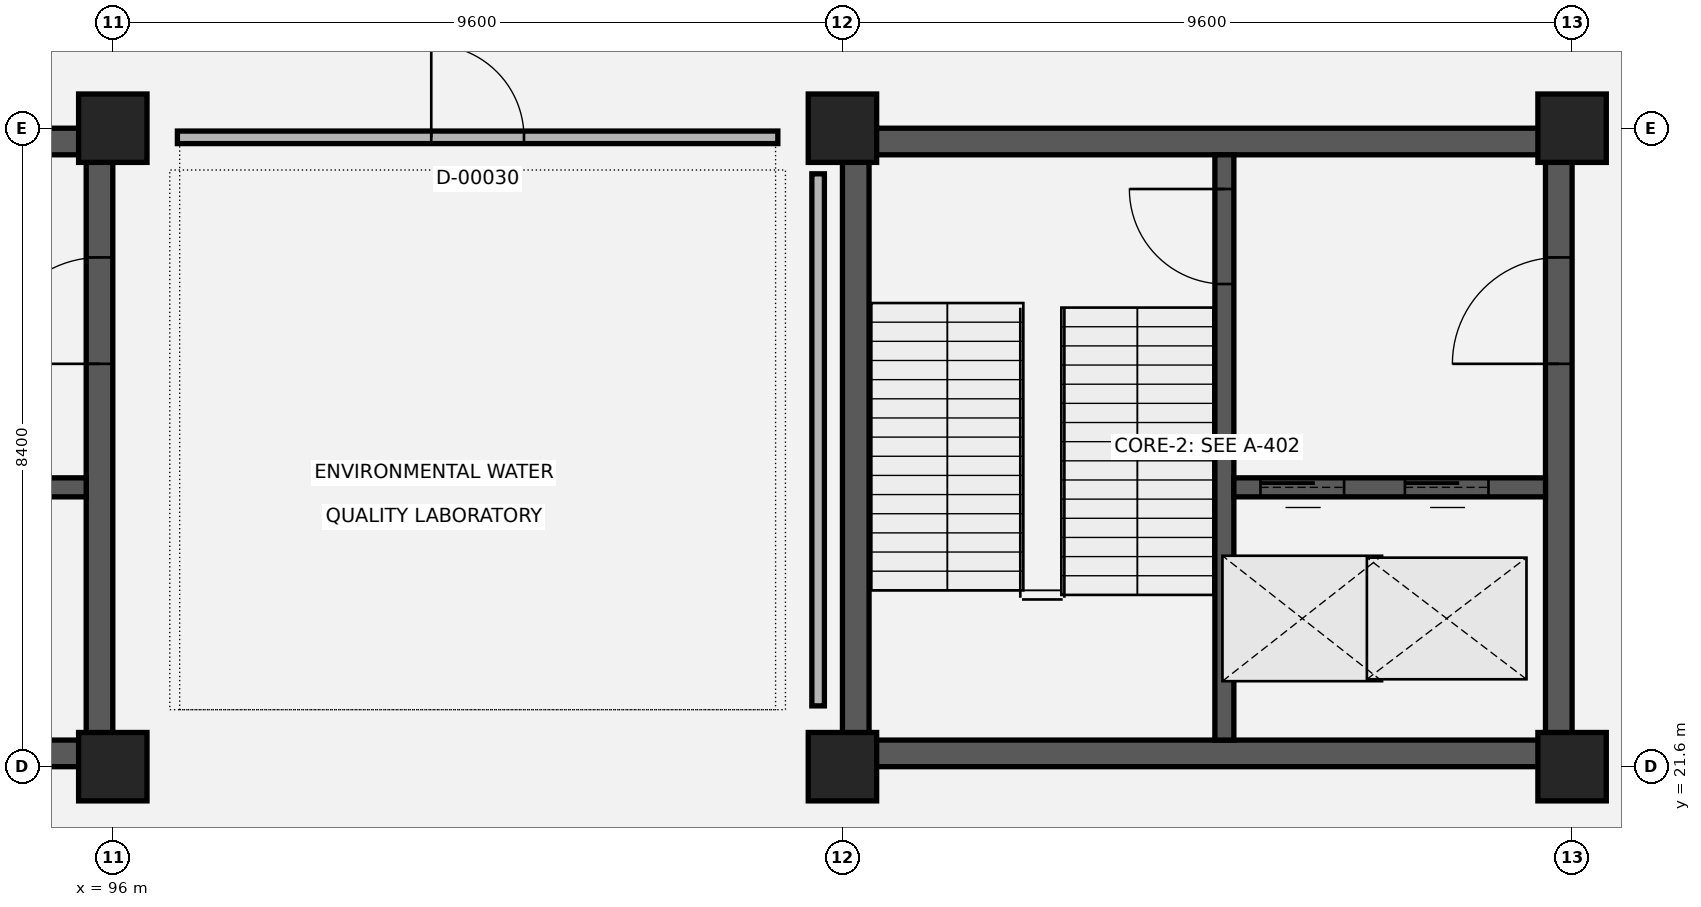
"""IFC4 building model, lengths in metres.
Left out: names, types, materials, properties, quantities, classifications, styles, units other than length and angle.
Written with IfcOpenShell. Run it as: python <this file> out.ifc"""

import sys

from ifc_helpers import new_model, si_unit, direction, frame, frame_2d, origin, origin_2d, place, context, subcontext, project, spatial, rectangle, extrude, element, fill, save


model = new_model("IFC4")
c1 = context("Model", 3, precision=1e-05, world=origin(), true_north=direction((0.0, 1.0)))
c2 = subcontext(c1, "Body", "Model", "MODEL_VIEW")
j1 = project(units=[si_unit("LENGTHUNIT", "METRE"), si_unit("PLANEANGLEUNIT", "RADIAN")], contexts=[c1])
p1 = place(None, origin())
s1 = spatial("IfcSite", under=j1, at=p1, CompositionType="ELEMENT")
p2 = place(p1, origin())
s2 = spatial("IfcBuilding", under=s1, at=p2, CompositionType="ELEMENT")
p3 = place(p2, origin())
s3 = spatial("IfcBuildingStorey", under=s2, at=p3, CompositionType="ELEMENT", Elevation=0.0)
for number, where, z_axis, x_axis in (
    (1, (96.0, 21.6, 0.0), (0.0, 0.0, 1.0), (1.0, 0.0, 0.0)),
    (2, (96.0, 30.0, 0.0), (0.0, 0.0, 1.0), (1.0, 0.0, 0.0)),
    (3, (105.6, 21.6, 0.0), (0.0, 0.0, 1.0), (1.0, 0.0, 0.0)),
    (4, (105.6, 30.0, 0.0), (0.0, 0.0, 1.0), (1.0, 0.0, 0.0)),
    (5, (115.2, 21.6, 0.0), (0.0, 0.0, 1.0), (1.0, 0.0, 0.0)),
    (6, (115.2, 30.0, 0.0), (0.0, 0.0, 1.0), (1.0, 0.0, 0.0)),
):
    element("IfcColumn", number, at=place(p3, frame(where, z_axis=z_axis, x_axis=x_axis)), inside=s3, PredefinedType="COLUMN", context=c2, shape_type="SweptSolid", body=[
        extrude(rectangle(XDim=0.9, YDim=0.9, at=origin_2d()), origin(), (0.0, 0.0, 1.0), 5.4),
    ])
for number, where, z_axis, x_axis in (
    (7, (105.6, 29.825, 0.0), (0.0, 0.0, 1.0), (1.0, 0.0, 0.0)),
    (8, (105.6, 21.775, 0.0), (0.0, 0.0, 1.0), (1.0, 0.0, 0.0)),
):
    element("IfcWall", number, at=place(p3, frame(where, z_axis=z_axis, x_axis=x_axis)), inside=s3, PredefinedType="SHEAR", context=c2, shape_type="SweptSolid", body=[
        extrude(rectangle(XDim=9.6, YDim=0.35, at=frame_2d((4.8, 0.0))), origin(), (0.0, 0.0, 1.0), 5.11),
    ])
p4 = place(p3, frame((105.775, 21.6, 0.0), z_axis=(0.0, 0.0, 1.0), x_axis=(0.0, 1.0, 0.0)))
e9 = element("IfcWall", 9, at=p4, inside=s3, PredefinedType="SHEAR", context=c2, shape_type="SweptSolid", body=[
    extrude(rectangle(XDim=8.4, YDim=0.35, at=frame_2d((4.2, 0.0))), origin(), (0.0, 0.0, 1.0), 5.11),
])
p5 = place(p3, frame((115.025, 21.6, 0.0), z_axis=(0.0, 0.0, 1.0), x_axis=(0.0, 1.0, 0.0)))
e10 = element("IfcWall", 10, at=p5, inside=s3, PredefinedType="SHEAR", context=c2, shape_type="SweptSolid", body=[
    extrude(rectangle(XDim=8.4, YDim=0.35, at=frame_2d((4.2, 0.0))), origin(), (0.0, 0.0, 1.0), 5.11),
])
p6 = place(p5, frame((5.3, 0.0, 0.0)))
e11 = element("IfcOpeningElement", 11, at=p6, cuts=e10, PredefinedType="OPENING", context=c2, shape_type="SweptSolid", body=[
    extrude(rectangle(XDim=1.4, YDim=2.15, at=frame_2d((0.7, 1.075))), frame((0.0, 0.185, 0.0), z_axis=(0.0, -1.0, 0.0), x_axis=(1.0, 0.0, 0.0)), (0.0, 0.0, 1.0), 0.37),
])
p7 = place(p3, frame((110.625, 29.65, 0.0), z_axis=(0.0, 0.0, 1.0), x_axis=(0.0, -1.0, 0.0)))
e12 = element("IfcWall", 12, at=p7, inside=s3, PredefinedType="SHEAR", context=c2, shape_type="SweptSolid", body=[
    extrude(rectangle(XDim=7.7, YDim=0.25, at=frame_2d((3.85, 0.0))), origin(), (0.0, 0.0, 1.0), 5.11),
])
p8 = place(p7, frame((0.45, 0.0, 0.0)))
e13 = element("IfcOpeningElement", 13, at=p8, cuts=e12, PredefinedType="OPENING", context=c2, shape_type="SweptSolid", body=[
    extrude(rectangle(XDim=1.25, YDim=2.15, at=frame_2d((0.625, 1.075))), frame((0.0, 0.135, 0.0), z_axis=(0.0, -1.0, 0.0), x_axis=(1.0, 0.0, 0.0)), (0.0, 0.0, 1.0), 0.27),
])
p9 = place(p3, frame((110.75, 25.275, 0.0), z_axis=(0.0, 0.0, 1.0), x_axis=(1.0, 0.0, 0.0)))
e14 = element("IfcWall", 14, at=p9, inside=s3, PredefinedType="SHEAR", context=c2, shape_type="SweptSolid", body=[
    extrude(rectangle(XDim=4.1, YDim=0.25, at=frame_2d((2.05, 0.0))), origin(), (0.0, 0.0, 1.0), 5.11),
])
p10 = place(p9, frame((0.35, 0.0, 0.0)))
e15 = element("IfcOpeningElement", 15, at=p10, cuts=e14, PredefinedType="OPENING", context=c2, shape_type="SweptSolid", body=[
    extrude(rectangle(XDim=1.1, YDim=2.15, at=frame_2d((0.55, 1.075))), frame((0.0, 0.135, 0.0), z_axis=(0.0, -1.0, 0.0), x_axis=(1.0, 0.0, 0.0)), (0.0, 0.0, 1.0), 0.27),
])
p11 = place(p9, frame((2.25, 0.0, 0.0)))
e16 = element("IfcOpeningElement", 16, at=p11, cuts=e14, PredefinedType="OPENING", context=c2, shape_type="SweptSolid", body=[
    extrude(rectangle(XDim=1.1, YDim=2.15, at=frame_2d((0.55, 1.075))), frame((0.0, 0.135, 0.0), z_axis=(0.0, -1.0, 0.0), x_axis=(1.0, 0.0, 0.0)), (0.0, 0.0, 1.0), 0.27),
])
for number, where, z_axis, x_axis in (
    (17, (86.4, 29.825, 0.0), (0.0, 0.0, 1.0), (1.0, 0.0, 0.0)),
    (18, (86.4, 21.775, 0.0), (0.0, 0.0, 1.0), (1.0, 0.0, 0.0)),
):
    element("IfcWall", number, at=place(p3, frame(where, z_axis=z_axis, x_axis=x_axis)), inside=s3, PredefinedType="SHEAR", context=c2, shape_type="SweptSolid", body=[
        extrude(rectangle(XDim=9.6, YDim=0.35, at=frame_2d((4.8, 0.0))), origin(), (0.0, 0.0, 1.0), 5.11),
    ])
p12 = place(p3, frame((95.825, 21.6, 0.0), z_axis=(0.0, 0.0, 1.0), x_axis=(0.0, 1.0, 0.0)))
e19 = element("IfcWall", 19, at=p12, inside=s3, PredefinedType="SHEAR", context=c2, shape_type="SweptSolid", body=[
    extrude(rectangle(XDim=8.4, YDim=0.35, at=frame_2d((4.2, 0.0))), origin(), (0.0, 0.0, 1.0), 5.11),
])
p13 = place(p12, frame((5.3, 0.0, 0.0)))
e20 = element("IfcOpeningElement", 20, at=p13, cuts=e19, PredefinedType="OPENING", context=c2, shape_type="SweptSolid", body=[
    extrude(rectangle(XDim=1.4, YDim=2.15, at=frame_2d((0.7, 1.075))), frame((0.0, 0.185, 0.0), z_axis=(0.0, -1.0, 0.0), x_axis=(1.0, 0.0, 0.0)), (0.0, 0.0, 1.0), 0.37),
])
p14 = place(p3, frame((91.55, 25.275, 0.0), z_axis=(0.0, 0.0, 1.0), x_axis=(1.0, 0.0, 0.0)))
e21 = element("IfcWall", 21, at=p14, inside=s3, PredefinedType="SHEAR", context=c2, shape_type="SweptSolid", body=[
    extrude(rectangle(XDim=4.1, YDim=0.25, at=frame_2d((2.05, 0.0))), origin(), (0.0, 0.0, 1.0), 5.11),
])
p15 = place(p14, frame((1.4, 0.0, 0.0)))
e22 = element("IfcOpeningElement", 22, at=p15, cuts=e21, PredefinedType="OPENING", context=c2, shape_type="SweptSolid", body=[
    extrude(rectangle(XDim=1.2, YDim=2.15, at=frame_2d((0.6, 1.075))), frame((0.0, 0.135, 0.0), z_axis=(0.0, -1.0, 0.0), x_axis=(1.0, 0.0, 0.0)), (0.0, 0.0, 1.0), 0.27),
])
p16 = place(p3, frame((96.85, 29.88, 0.0), z_axis=(0.0, 0.0, 1.0), x_axis=(1.0, 0.0, 0.0)))
e23 = element("IfcWall", 23, at=p16, inside=s3, PredefinedType="PARTITIONING", context=c2, shape_type="SweptSolid", body=[
    extrude(rectangle(XDim=7.9, YDim=0.165, at=frame_2d((3.95, 0.0))), origin(), (0.0, 0.0, 1.0), 4.04),
])
p17 = place(p16, frame((3.34, 0.0, 0.0)))
e24 = element("IfcOpeningElement", 24, at=p17, cuts=e23, PredefinedType="OPENING", context=c2, shape_type="SweptSolid", body=[
    extrude(rectangle(XDim=1.22, YDim=2.15, at=frame_2d((0.61, 1.075))), frame((0.0, 0.093, 0.0), z_axis=(0.0, -1.0, 0.0), x_axis=(1.0, 0.0, 0.0)), (0.0, 0.0, 1.0), 0.185),
])
p18 = place(p3, frame((105.28, 22.4, 0.0), z_axis=(0.0, 0.0, 1.0), x_axis=(0.0, 1.0, 0.0)))
e25 = element("IfcWall", 25, at=p18, inside=s3, PredefinedType="PARTITIONING", context=c2, shape_type="SweptSolid", body=[
    extrude(rectangle(XDim=7.0, YDim=0.165, at=frame_2d((3.5, 0.0))), origin(), (0.0, 0.0, 1.0), 4.04),
])
p19 = place(p8, origin())
e26 = element("IfcDoor", 26, at=p19, inside=s3, OperationType="SINGLE_SWING_RIGHT", PredefinedType="DOOR", context=c2, shape_type="SweptSolid", body=[
    extrude(rectangle(XDim=1.25, YDim=2.15, at=frame_2d((0.625, 1.075))), frame((0.0, 0.025, 0.0), z_axis=(0.0, -1.0, 0.0), x_axis=(1.0, 0.0, 0.0)), (0.0, 0.0, 1.0), 0.05),
])
fill(e13, e26)
p20 = place(p10, origin())
e27 = element("IfcDoor", 27, at=p20, inside=s3, OperationType="SLIDING_TO_LEFT", PredefinedType="DOOR", context=c2, shape_type="SweptSolid", body=[
    extrude(rectangle(XDim=1.1, YDim=2.15, at=frame_2d((0.55, 1.075))), frame((0.0, 0.025, 0.0), z_axis=(0.0, -1.0, 0.0), x_axis=(1.0, 0.0, 0.0)), (0.0, 0.0, 1.0), 0.05),
])
fill(e15, e27)
p21 = place(p11, origin())
e28 = element("IfcDoor", 28, at=p21, inside=s3, OperationType="SLIDING_TO_LEFT", PredefinedType="DOOR", context=c2, shape_type="SweptSolid", body=[
    extrude(rectangle(XDim=1.1, YDim=2.15, at=frame_2d((0.55, 1.075))), frame((0.0, 0.025, 0.0), z_axis=(0.0, -1.0, 0.0), x_axis=(1.0, 0.0, 0.0)), (0.0, 0.0, 1.0), 0.05),
])
fill(e16, e28)
p22 = place(p6, origin())
e29 = element("IfcDoor", 29, at=p22, inside=s3, OperationType="SINGLE_SWING_LEFT", PredefinedType="DOOR", context=c2, shape_type="SweptSolid", body=[
    extrude(rectangle(XDim=1.4, YDim=2.15, at=frame_2d((0.7, 1.075))), frame((0.0, 0.025, 0.0), z_axis=(0.0, -1.0, 0.0), x_axis=(1.0, 0.0, 0.0)), (0.0, 0.0, 1.0), 0.05),
])
fill(e11, e29)
p23 = place(p13, origin())
e30 = element("IfcDoor", 30, at=p23, inside=s3, OperationType="SINGLE_SWING_LEFT", PredefinedType="DOOR", context=c2, shape_type="SweptSolid", body=[
    extrude(rectangle(XDim=1.4, YDim=2.15, at=frame_2d((0.7, 1.075))), frame((0.0, 0.025, 0.0), z_axis=(0.0, -1.0, 0.0), x_axis=(1.0, 0.0, 0.0)), (0.0, 0.0, 1.0), 0.05),
])
fill(e20, e30)
p24 = place(p17, origin())
e31 = element("IfcDoor", 31, at=p24, inside=s3, OperationType="SINGLE_SWING_LEFT", PredefinedType="DOOR", context=c2, shape_type="SweptSolid", body=[
    extrude(rectangle(XDim=1.22, YDim=2.15, at=frame_2d((0.61, 1.075))), frame((0.0, 0.025, 0.0), z_axis=(0.0, -1.0, 0.0), x_axis=(1.0, 0.0, 0.0)), (0.0, 0.0, 1.0), 0.05),
])
fill(e24, e31)
save(model, sys.argv[1])
